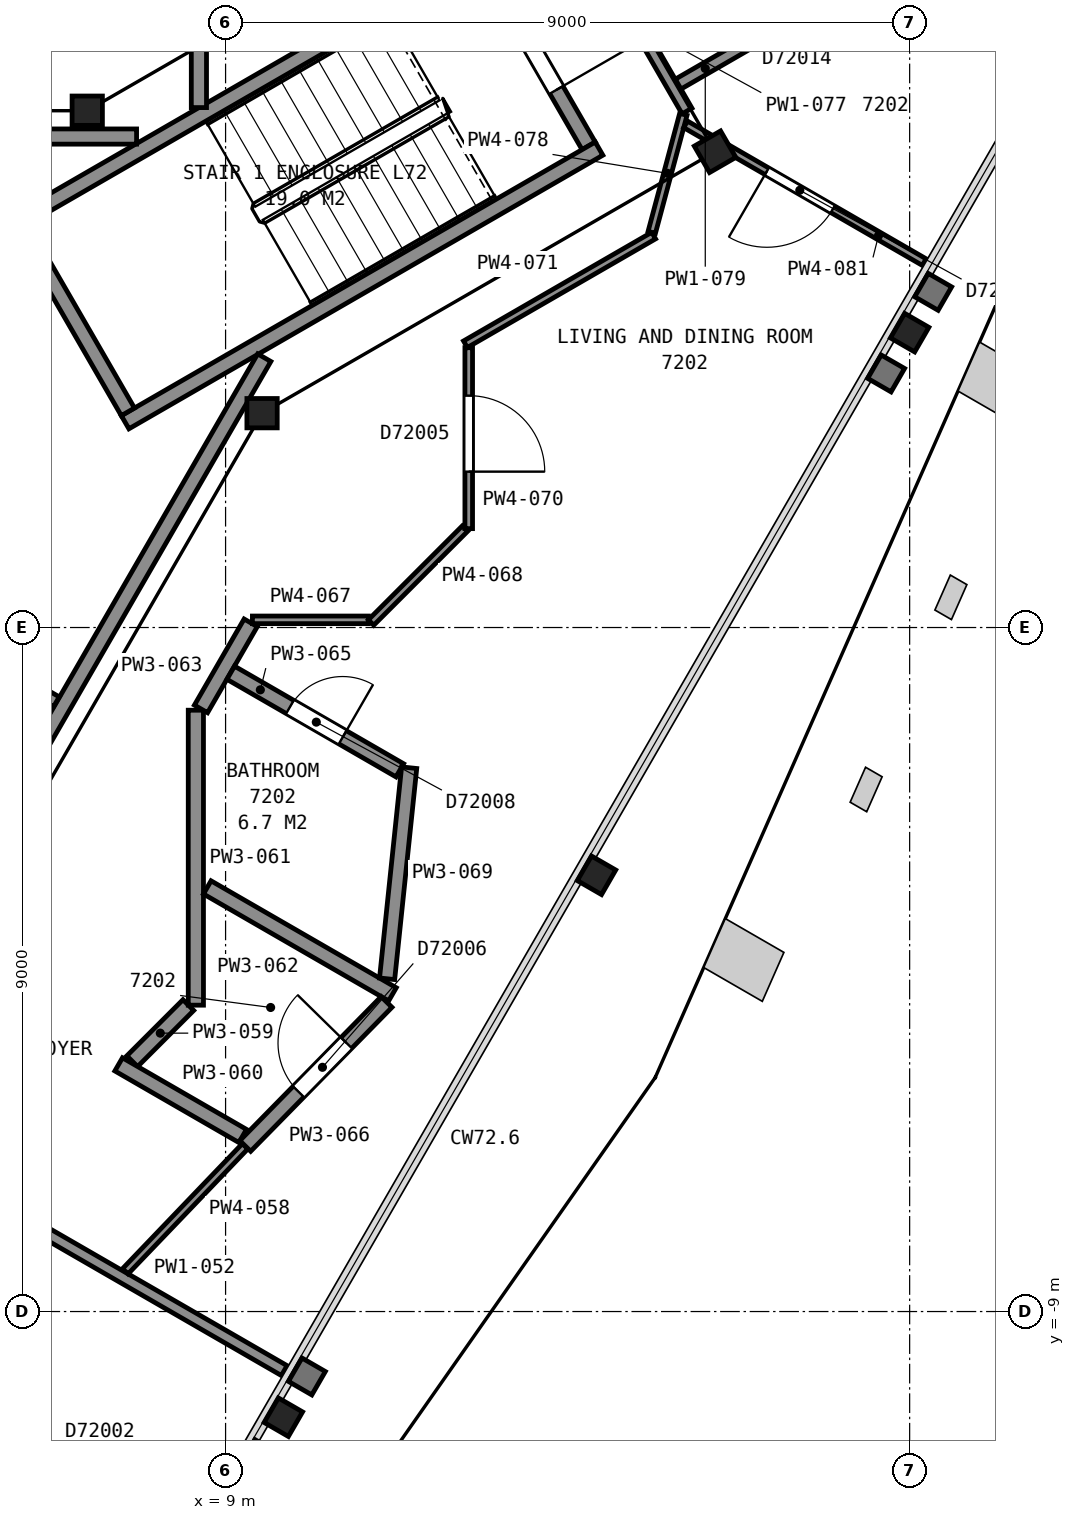
"""IFC4 building model, lengths in metres.
Left out: names, types, materials, properties, quantities, classifications, styles, units other than length and angle.
Written with IfcOpenShell. Run it as: python <this file> out.ifc"""

import sys

from ifc_helpers import new_model, si_unit, direction, frame, frame_2d, origin, origin_2d, place, context, subcontext, project, spatial, rectangle, i_section, extrude, element, fill, save


model = new_model("IFC4")
c1 = context("Model", 3, precision=1e-05, world=origin(), true_north=direction((0.0, 1.0)))
c2 = subcontext(c1, "Body", "Model", "MODEL_VIEW")
j1 = project(units=[si_unit("LENGTHUNIT", "METRE"), si_unit("PLANEANGLEUNIT", "RADIAN")], contexts=[c1])
p1 = place(None, origin())
s1 = spatial("IfcSite", under=j1, at=p1, CompositionType="ELEMENT")
p2 = place(p1, origin())
s2 = spatial("IfcBuilding", under=s1, at=p2, CompositionType="ELEMENT")
p3 = place(p2, frame((0.0, 0.0, 286.2)))
s3 = spatial("IfcBuildingStorey", under=s2, at=p3, CompositionType="ELEMENT", Elevation=286.2)
for number, where, z_axis, x_axis in (
    (1, (9.76, -10.39, 0.0), (0.0, 0.0, 1.0), (-0.5, -0.866, 0.0)),
    (2, (13.88, -3.26, 0.0), (0.0, 0.0, 1.0), (-0.5, -0.866, 0.0)),
    (3, (18.0, 3.88, 0.0), (0.0, 0.0, 1.0), (-0.5, -0.866, 0.0)),
):
    element("IfcColumn", number, at=place(p3, frame(where, z_axis=z_axis, x_axis=x_axis)), inside=s3, PredefinedType="COLUMN", context=c2, shape_type="SweptSolid", body=[
        extrude(i_section(OverallWidth=0.373, OverallDepth=0.368, WebThickness=0.015, FlangeThickness=0.024, FilletRadius=0.015, at=origin_2d()), origin(), (0.0, 0.0, 1.0), 3.7),
    ])
p4 = place(p3, frame((9.48, 2.82, 0.0), z_axis=(0.0, 0.0, 1.0), x_axis=(1.0, 0.0, 0.0)))
e4 = element("IfcColumn", 4, at=p4, inside=s3, PredefinedType="COLUMN", context=c2, shape_type="SweptSolid", body=[
    extrude(i_section(OverallWidth=0.399, OverallDepth=0.386, WebThickness=0.021, FlangeThickness=0.033, FilletRadius=0.015, at=origin_2d()), origin(), (0.0, 0.0, 1.0), 3.7),
])
p5 = place(p3, frame((15.44, 6.26, 0.0), z_axis=(0.0, 0.0, 1.0), x_axis=(0.5, -0.866025403784, 0.0)))
e5 = element("IfcColumn", 5, at=p5, inside=s3, PredefinedType="COLUMN", context=c2, shape_type="SweptSolid", body=[
    extrude(i_section(OverallWidth=0.401, OverallDepth=0.399, WebThickness=0.025, FlangeThickness=0.04, FilletRadius=0.015, at=origin_2d()), origin(), (0.0, 0.0, 1.0), 3.7),
])
p6 = place(p3, frame((7.18, 6.8, 0.0), z_axis=(0.0, 0.0, 1.0), x_axis=(1.0, 0.0, 0.0)))
e6 = element("IfcColumn", 6, at=p6, inside=s3, PredefinedType="COLUMN", context=c2, shape_type="SweptSolid", body=[
    extrude(i_section(OverallWidth=0.399, OverallDepth=0.386, WebThickness=0.021, FlangeThickness=0.033, FilletRadius=0.015, at=origin_2d()), origin(), (0.0, 0.0, 1.0), 3.7),
])
p7 = place(p3, frame((13.777, 6.338, 0.0), z_axis=(0.0, 0.0, 1.0), x_axis=(-0.500049511043, 0.865996816683, 0.0)))
e7 = element("IfcWall", 7, at=p7, inside=s3, PredefinedType="PARTITIONING", context=c2, shape_type="SweptSolid", body=[
    extrude(rectangle(XDim=2.8, YDim=0.2, at=frame_2d((1.4, 0.0))), origin(), (0.0, 0.0, 1.0), 3.45),
])
p8 = place(p7, frame((0.85, 0.0, 0.0)))
e8 = element("IfcOpeningElement", 8, at=p8, cuts=e7, PredefinedType="OPENING", context=c2, shape_type="SweptSolid", body=[
    extrude(rectangle(XDim=1.1, YDim=2.1, at=frame_2d((0.55, 1.05))), frame((0.0, 0.11, 0.0), z_axis=(0.0, -1.0, 0.0), x_axis=(1.0, 0.0, 0.0)), (0.0, 0.0, 1.0), 0.22),
])
for number, where, z_axis, x_axis in (
    (9, (6.178, 5.299, 0.0), (0.0, 0.0, 1.0), (0.866, 0.5, 0.0)),
    (10, (7.678, 2.701, 0.0), (0.0, 0.0, 1.0), (0.866, 0.5, 0.0)),
):
    element("IfcWall", number, at=place(p3, frame(where, z_axis=z_axis, x_axis=x_axis)), inside=s3, PredefinedType="PARTITIONING", context=c2, shape_type="SweptSolid", body=[
        extrude(rectangle(XDim=7.2, YDim=0.2, at=frame_2d((3.6, 0.0))), origin(), (0.0, 0.0, 1.0), 3.45),
    ])
p9 = place(p3, frame((7.715, 2.838, 0.0), z_axis=(0.0, 0.0, 1.0), x_axis=(-0.500049511043, 0.865996816683, 0.0)))
e11 = element("IfcWall", 11, at=p9, inside=s3, PredefinedType="PARTITIONING", context=c2, shape_type="SweptSolid", body=[
    extrude(rectangle(XDim=2.8, YDim=0.2, at=frame_2d((1.4, 0.0))), origin(), (0.0, 0.0, 1.0), 3.45),
])
p10 = place(p3, frame((7.829, 6.46, 0.0), z_axis=(0.0, 0.0, 1.0), x_axis=(-1.0, 0.0, 0.0)))
e12 = element("IfcWall", 12, at=p10, inside=s3, PredefinedType="PARTITIONING", context=c2, shape_type="SweptSolid", body=[
    extrude(rectangle(XDim=15.658, YDim=0.2, at=frame_2d((7.829, 0.0))), origin(), (0.0, 0.0, 1.0), 3.45),
])
p11 = place(p10, frame((12.168, 0.0, 0.0)))
e13 = element("IfcOpeningElement", 13, at=p11, cuts=e12, PredefinedType="OPENING", context=c2, shape_type="SweptSolid", body=[
    extrude(rectangle(XDim=1.2, YDim=2.1, at=frame_2d((0.6, 1.05))), frame((0.0, 0.11, 0.0), z_axis=(0.0, -1.0, 0.0), x_axis=(1.0, 0.0, 0.0)), (0.0, 0.0, 1.0), 0.22),
])
p12 = place(p3, frame((3.828, -6.29, 0.0), z_axis=(0.0, 0.0, 1.0), x_axis=(0.499979739078, 0.866037101117, 0.0)))
e14 = element("IfcWall", 14, at=p12, inside=s3, PredefinedType="PARTITIONING", context=c2, shape_type="SweptSolid", body=[
    extrude(rectangle(XDim=11.363, YDim=0.2, at=frame_2d((5.681, 0.0))), origin(), (0.0, 0.0, 1.0), 3.45),
])
p13 = place(p12, frame((0.55, 0.0, 0.0)))
e15 = element("IfcOpeningElement", 15, at=p13, cuts=e14, PredefinedType="OPENING", context=c2, shape_type="SweptSolid", body=[
    extrude(rectangle(XDim=1.2, YDim=2.1, at=frame_2d((0.6, 1.05))), frame((0.0, 0.11, 0.0), z_axis=(0.0, -1.0, 0.0), x_axis=(1.0, 0.0, 0.0)), (0.0, 0.0, 1.0), 0.22),
])
p14 = place(p3, frame((6.774, -0.978, 0.0), z_axis=(0.0, 0.0, 1.0), x_axis=(-0.866062920605, 0.499935013329, 0.0)))
e16 = element("IfcWall", 16, at=p14, inside=s3, PredefinedType="PARTITIONING", context=c2, shape_type="SweptSolid", body=[
    extrude(rectangle(XDim=2.22, YDim=0.15, at=frame_2d((1.11, 0.0))), origin(), (0.0, 0.0, 1.0), 3.45),
])
p15 = place(p14, frame((0.646, 0.0, 0.0)))
e17 = element("IfcOpeningElement", 17, at=p15, cuts=e16, PredefinedType="OPENING", context=c2, shape_type="SweptSolid", body=[
    extrude(rectangle(XDim=0.9, YDim=2.1, at=frame_2d((0.45, 1.05))), frame((0.0, 0.085, 0.0), z_axis=(0.0, -1.0, 0.0), x_axis=(1.0, 0.0, 0.0)), (0.0, 0.0, 1.0), 0.17),
])
p16 = place(p3, frame((3.682, -9.495, 0.0), z_axis=(0.0, 0.0, 1.0), x_axis=(0.866046690806, -0.499963127985, 0.0)))
e18 = element("IfcWall", 18, at=p16, inside=s3, PredefinedType="PARTITIONING", context=c2, shape_type="SweptSolid", body=[
    extrude(rectangle(XDim=3.454, YDim=0.2, at=frame_2d((1.727, 0.0))), origin(), (0.0, 0.0, 1.0), 2.723),
])
p17 = place(p3, frame((9.772, -9.777, 0.0), z_axis=(0.0, 0.0, 1.0), x_axis=(-0.866083818164, 0.499898809675, 0.0)))
e19 = element("IfcWall", 19, at=p17, inside=s3, PredefinedType="PARTITIONING", context=c2, shape_type="SweptSolid", body=[
    extrude(rectangle(XDim=6.551, YDim=0.15, at=frame_2d((3.275, 0.0))), origin(), (0.0, 0.0, 1.0), 2.723),
])
p18 = place(p17, frame((4.001, 0.0, 0.0)))
e20 = element("IfcOpeningElement", 20, at=p18, cuts=e19, PredefinedType="OPENING", context=c2, shape_type="SweptSolid", body=[
    extrude(rectangle(XDim=1.0, YDim=2.1, at=frame_2d((0.5, 1.05))), frame((0.0, 0.085, 0.0), z_axis=(0.0, -1.0, 0.0), x_axis=(1.0, 0.0, 0.0)), (0.0, 0.0, 1.0), 0.17),
])
p19 = place(p3, frame((7.681, -8.47, 0.0), z_axis=(0.0, 0.0, 1.0), x_axis=(0.691774963189, 0.722113149239, 0.0)))
e21 = element("IfcWall", 21, at=p19, inside=s3, PredefinedType="PARTITIONING", context=c2, shape_type="SweptSolid", body=[
    extrude(rectangle(XDim=2.277, YDim=0.1, at=frame_2d((1.139, 0.0))), origin(), (0.0, 0.0, 1.0), 2.723),
])
p20 = place(p3, frame((7.772, -5.706, 0.0), z_axis=(0.0, 0.0, 1.0), x_axis=(0.707106781187, 0.707106781187, 0.0)))
e22 = element("IfcWall", 22, at=p20, inside=s3, PredefinedType="PARTITIONING", context=c2, shape_type="SweptSolid", body=[
    extrude(rectangle(XDim=1.044, YDim=0.2, at=frame_2d((0.522, 0.0))), origin(), (0.0, 0.0, 1.0), 2.723),
])
p21 = place(p3, frame((7.594, -5.748, 0.0), z_axis=(0.0, 0.0, 1.0), x_axis=(0.866049635583, -0.499958026946, 0.0)))
e23 = element("IfcWall", 23, at=p21, inside=s3, PredefinedType="PARTITIONING", context=c2, shape_type="SweptSolid", body=[
    extrude(rectangle(XDim=1.884, YDim=0.2, at=frame_2d((0.942, 0.0))), origin(), (0.0, 0.0, 1.0), 2.723),
])
p22 = place(p3, frame((8.609, -4.969, 0.0), z_axis=(0.0, 0.0, 1.0), x_axis=(0.0, 1.0, 0.0)))
e24 = element("IfcWall", 24, at=p22, inside=s3, PredefinedType="PARTITIONING", context=c2, shape_type="SweptSolid", body=[
    extrude(rectangle(XDim=3.881, YDim=0.2, at=frame_2d((1.94, 0.0))), origin(), (0.0, 0.0, 1.0), 2.723),
])
p23 = place(p3, frame((8.759, -3.42, 0.0), z_axis=(0.0, 0.0, 1.0), x_axis=(0.866098885879, -0.499872703674, 0.0)))
e25 = element("IfcWall", 25, at=p23, inside=s3, PredefinedType="PARTITIONING", context=c2, shape_type="SweptSolid", body=[
    extrude(rectangle(XDim=2.813, YDim=0.2, at=frame_2d((1.407, 0.0))), origin(), (0.0, 0.0, 1.0), 2.723),
])
p24 = place(p3, frame((8.677, -1.071, 0.0), z_axis=(0.0, 0.0, 1.0), x_axis=(0.49993245451, 0.866064397679, 0.0)))
e26 = element("IfcWall", 26, at=p24, inside=s3, PredefinedType="PARTITIONING", context=c2, shape_type="SweptSolid", body=[
    extrude(rectangle(XDim=1.308, YDim=0.2, at=frame_2d((0.654, 0.0))), origin(), (0.0, 0.0, 1.0), 2.723),
])
p25 = place(p3, frame((8.649, 6.841, 0.0), z_axis=(0.0, 0.0, 1.0), x_axis=(0.0, 1.0, 0.0)))
e27 = element("IfcWall", 27, at=p25, inside=s3, PredefinedType="PARTITIONING", context=c2, shape_type="SweptSolid", body=[
    extrude(rectangle(XDim=1.528, YDim=0.2, at=frame_2d((0.764, 0.0))), origin(), (0.0, 0.0, 1.0), 2.723),
])
p26 = place(p3, frame((11.292, -1.879, 0.0), z_axis=(0.0, 0.0, 1.0), x_axis=(-0.866123870273, 0.499829412243, 0.0)))
e28 = element("IfcWall", 28, at=p26, inside=s3, PredefinedType="PARTITIONING", context=c2, shape_type="SweptSolid", body=[
    extrude(rectangle(XDim=2.569, YDim=0.2, at=frame_2d((1.284, 0.0))), origin(), (0.0, 0.0, 1.0), 2.723),
])
p27 = place(p26, frame((0.869, 0.0, 0.0)))
e29 = element("IfcOpeningElement", 29, at=p27, cuts=e28, PredefinedType="OPENING", context=c2, shape_type="SweptSolid", body=[
    extrude(rectangle(XDim=0.8, YDim=2.1, at=frame_2d((0.4, 1.05))), frame((0.0, 0.11, 0.0), z_axis=(0.0, -1.0, 0.0), x_axis=(1.0, 0.0, 0.0)), (0.0, 0.0, 1.0), 0.22),
])
p28 = place(p3, frame((9.259, -6.821, 0.0), z_axis=(0.0, 0.0, 1.0), x_axis=(0.700360124324, 0.713789672282, 0.0)))
e30 = element("IfcWall", 30, at=p28, inside=s3, PredefinedType="PARTITIONING", context=c2, shape_type="SweptSolid", body=[
    extrude(rectangle(XDim=2.654, YDim=0.2, at=frame_2d((1.327, 0.0))), origin(), (0.0, 0.0, 1.0), 2.723),
])
p29 = place(p28, frame((1.0, 0.0, 0.0)))
e31 = element("IfcOpeningElement", 31, at=p29, cuts=e30, PredefinedType="OPENING", context=c2, shape_type="SweptSolid", body=[
    extrude(rectangle(XDim=0.9, YDim=2.1, at=frame_2d((0.45, 1.05))), frame((0.0, 0.11, 0.0), z_axis=(0.0, -1.0, 0.0), x_axis=(1.0, 0.0, 0.0)), (0.0, 0.0, 1.0), 0.22),
])
p30 = place(p3, frame((9.353, 0.101, 0.0), z_axis=(0.0, 0.0, 1.0), x_axis=(1.0, 0.0, 0.0)))
e32 = element("IfcWall", 32, at=p30, inside=s3, PredefinedType="PARTITIONING", context=c2, shape_type="SweptSolid", body=[
    extrude(rectangle(XDim=1.526, YDim=0.1, at=frame_2d((0.763, 0.0))), origin(), (0.0, 0.0, 1.0), 2.723),
])
p31 = place(p3, frame((10.914, 0.066, 0.0), z_axis=(0.0, 0.0, 1.0), x_axis=(0.707106781187, 0.707106781187, 0.0)))
e33 = element("IfcWall", 33, at=p31, inside=s3, PredefinedType="PARTITIONING", context=c2, shape_type="SweptSolid", body=[
    extrude(rectangle(XDim=1.748, YDim=0.1, at=frame_2d((0.874, 0.0))), origin(), (0.0, 0.0, 1.0), 2.723),
])
p32 = place(p3, frame((11.125, -4.622, 0.0), z_axis=(0.0, 0.0, 1.0), x_axis=(0.103952036587, 0.99458231137, 0.0)))
e34 = element("IfcWall", 34, at=p32, inside=s3, PredefinedType="PARTITIONING", context=c2, shape_type="SweptSolid", body=[
    extrude(rectangle(XDim=2.792, YDim=0.2, at=frame_2d((1.396, 0.0))), origin(), (0.0, 0.0, 1.0), 2.723),
])
p33 = place(p3, frame((12.199, 3.682, 0.0), z_axis=(0.0, 0.0, 1.0), x_axis=(0.0, -1.0, 0.0)))
e35 = element("IfcWall", 35, at=p33, inside=s3, PredefinedType="PARTITIONING", context=c2, shape_type="SweptSolid", body=[
    extrude(rectangle(XDim=2.381, YDim=0.1, at=frame_2d((1.19, 0.0))), origin(), (0.0, 0.0, 1.0), 2.723),
])
p34 = place(p33, frame((0.631, 0.0, 0.0)))
e36 = element("IfcOpeningElement", 36, at=p34, cuts=e35, PredefinedType="OPENING", context=c2, shape_type="SweptSolid", body=[
    extrude(rectangle(XDim=1.0, YDim=2.1, at=frame_2d((0.5, 1.05))), frame((0.0, 0.06, 0.0), z_axis=(0.0, -1.0, 0.0), x_axis=(1.0, 0.0, 0.0)), (0.0, 0.0, 1.0), 0.12),
])
p35 = place(p3, frame((12.156, 3.727, 0.0), z_axis=(0.0, 0.0, 1.0), x_axis=(0.866012137121, 0.500022977831, 0.0)))
e37 = element("IfcWall", 37, at=p35, inside=s3, PredefinedType="PARTITIONING", context=c2, shape_type="SweptSolid", body=[
    extrude(rectangle(XDim=2.86, YDim=0.1, at=frame_2d((1.43, 0.0))), origin(), (0.0, 0.0, 1.0), 2.723),
])
p36 = place(p3, frame((13.759, 9.069, 0.0), z_axis=(0.0, 0.0, 1.0), x_axis=(0.500020344131, -0.866013657776, 0.0)))
e38 = element("IfcWall", 38, at=p36, inside=s3, PredefinedType="PARTITIONING", context=c2, shape_type="SweptSolid", body=[
    extrude(rectangle(XDim=2.625, YDim=0.15, at=frame_2d((1.312, 0.0))), origin(), (0.0, 0.0, 1.0), 2.723),
])
p37 = place(p3, frame((14.607, 5.2, 0.0), z_axis=(0.0, 0.0, 1.0), x_axis=(0.258589257768, 0.965987368327, 0.0)))
e39 = element("IfcWall", 39, at=p37, inside=s3, PredefinedType="PARTITIONING", context=c2, shape_type="SweptSolid", body=[
    extrude(rectangle(XDim=1.607, YDim=0.1, at=frame_2d((0.803, 0.0))), origin(), (0.0, 0.0, 1.0), 2.723),
])
p38 = place(p3, frame((14.954, 7.149, 0.0), z_axis=(0.0, 0.0, 1.0), x_axis=(0.865960792519, 0.5001118933, 0.0)))
e40 = element("IfcWall", 40, at=p38, inside=s3, PredefinedType="PARTITIONING", context=c2, shape_type="SweptSolid", body=[
    extrude(rectangle(XDim=1.375, YDim=0.15, at=frame_2d((0.688, 0.0))), origin(), (0.0, 0.0, 1.0), 2.723),
])
p39 = place(p3, frame((15.052, 6.62, 0.0), z_axis=(0.0, 0.0, 1.0), x_axis=(0.866029693906, -0.499992569217, 0.0)))
e41 = element("IfcWall", 41, at=p39, inside=s3, PredefinedType="PARTITIONING", context=c2, shape_type="SweptSolid", body=[
    extrude(rectangle(XDim=3.625, YDim=0.1, at=frame_2d((1.812, 0.0))), origin(), (0.0, 0.0, 1.0), 2.723),
])
p40 = place(p39, frame((1.235, 0.0, 0.0)))
e42 = element("IfcOpeningElement", 42, at=p40, cuts=e41, PredefinedType="OPENING", context=c2, shape_type="SweptSolid", body=[
    extrude(rectangle(XDim=1.0, YDim=2.1, at=frame_2d((0.5, 1.05))), frame((0.0, 0.06, 0.0), z_axis=(0.0, -1.0, 0.0), x_axis=(1.0, 0.0, 0.0)), (0.0, 0.0, 1.0), 0.12),
])
p41 = place(p8, origin())
e43 = element("IfcDoor", 43, at=p41, inside=s3, OperationType="SINGLE_SWING_LEFT", PredefinedType="DOOR", context=c2, shape_type="SweptSolid", body=[
    extrude(rectangle(XDim=1.1, YDim=2.1, at=frame_2d((0.55, 1.05))), frame((0.0, 0.025, 0.0), z_axis=(0.0, -1.0, 0.0), x_axis=(1.0, 0.0, 0.0)), (0.0, 0.0, 1.0), 0.05),
])
fill(e8, e43)
p42 = place(p27, origin())
e44 = element("IfcDoor", 44, at=p42, inside=s3, OperationType="SINGLE_SWING_LEFT", PredefinedType="DOOR", context=c2, shape_type="SweptSolid", body=[
    extrude(rectangle(XDim=0.8, YDim=2.1, at=frame_2d((0.4, 1.05))), frame((0.0, 0.025, 0.0), z_axis=(0.0, -1.0, 0.0), x_axis=(1.0, 0.0, 0.0)), (0.0, 0.0, 1.0), 0.05),
])
fill(e29, e44)
p43 = place(p29, origin())
e45 = element("IfcDoor", 45, at=p43, inside=s3, OperationType="SINGLE_SWING_RIGHT", PredefinedType="DOOR", context=c2, shape_type="SweptSolid", body=[
    extrude(rectangle(XDim=0.9, YDim=2.1, at=frame_2d((0.45, 1.05))), frame((0.0, 0.025, 0.0), z_axis=(0.0, -1.0, 0.0), x_axis=(1.0, 0.0, 0.0)), (0.0, 0.0, 1.0), 0.05),
])
fill(e31, e45)
p44 = place(p34, origin())
e46 = element("IfcDoor", 46, at=p44, inside=s3, OperationType="SINGLE_SWING_RIGHT", PredefinedType="DOOR", context=c2, shape_type="SweptSolid", body=[
    extrude(rectangle(XDim=1.0, YDim=2.1, at=frame_2d((0.5, 1.05))), frame((0.0, 0.025, 0.0), z_axis=(0.0, -1.0, 0.0), x_axis=(1.0, 0.0, 0.0)), (0.0, 0.0, 1.0), 0.05),
])
fill(e36, e46)
p45 = place(p40, origin())
e47 = element("IfcDoor", 47, at=p45, inside=s3, OperationType="SINGLE_SWING_LEFT", PredefinedType="DOOR", context=c2, shape_type="SweptSolid", body=[
    extrude(rectangle(XDim=1.0, YDim=2.1, at=frame_2d((0.5, 1.05))), frame((0.0, 0.025, 0.0), z_axis=(0.0, -1.0, 0.0), x_axis=(1.0, 0.0, 0.0)), (0.0, 0.0, 1.0), 0.05),
])
fill(e42, e47)
save(model, sys.argv[1])
